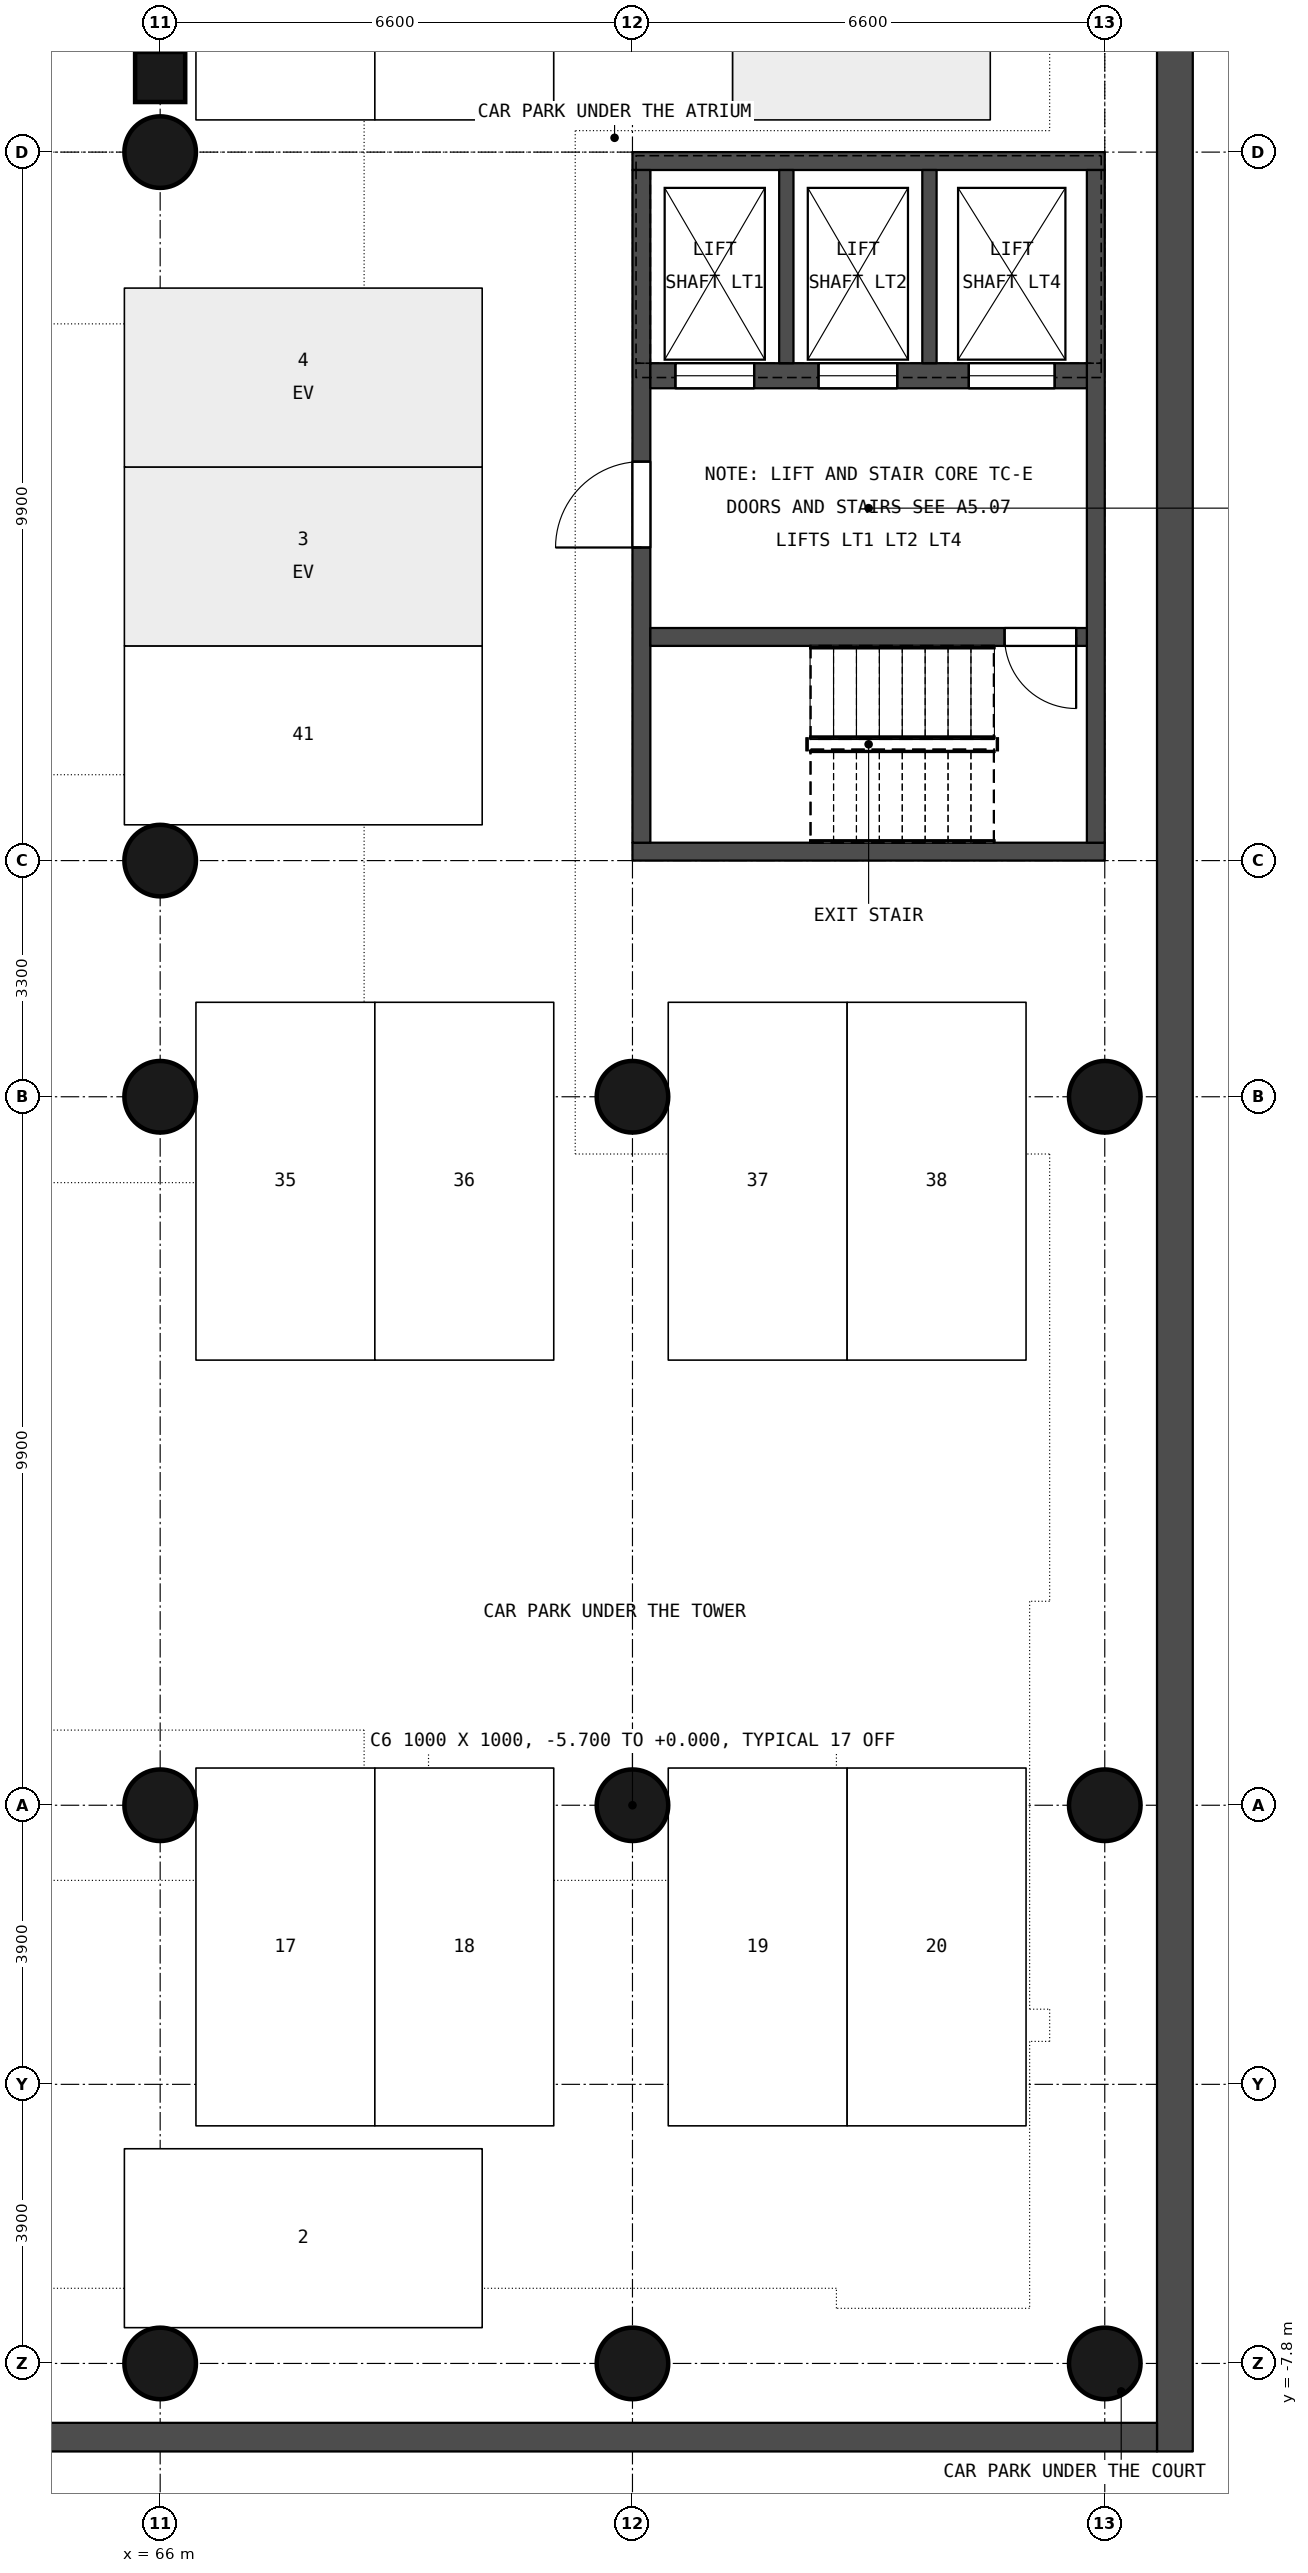
"""IFC4 building model, lengths in metres.
Left out: names, types, materials, properties, quantities, classifications, styles, units other than length and angle.
Written with IfcOpenShell. Run it as: python <this file> out.ifc"""

import sys

from ifc_helpers import new_model, si_unit, direction, frame, frame_2d, origin, origin_2d, place, context, subcontext, project, spatial, rectangle, circle, extrude, element, fill, save


model = new_model("IFC4")
c1 = context("Model", 3, precision=1e-05, world=origin(), true_north=direction((0.0, 1.0)))
c2 = subcontext(c1, "Body", "Model", "MODEL_VIEW")
j1 = project(units=[si_unit("LENGTHUNIT", "METRE"), si_unit("PLANEANGLEUNIT", "RADIAN")], contexts=[c1])
p1 = place(None, origin())
s1 = spatial("IfcSite", under=j1, at=p1, CompositionType="ELEMENT")
p2 = place(p1, origin())
s2 = spatial("IfcBuilding", under=s1, at=p2, CompositionType="ELEMENT")
p3 = place(p2, frame((0.0, 0.0, -5.7)))
s3 = spatial("IfcBuildingStorey", under=s2, at=p3, CompositionType="ELEMENT", Elevation=-5.7)
for number, where, z_axis, x_axis in (
    (1, (66.0, -7.8, 0.0), (0.0, 0.0, 1.0), (1.0, 0.0, 0.0)),
    (2, (66.0, 0.0, 0.0), (0.0, 0.0, 1.0), (1.0, 0.0, 0.0)),
    (3, (66.0, 9.9, 0.0), (0.0, 0.0, 1.0), (1.0, 0.0, 0.0)),
    (4, (66.0, 13.2, 0.0), (0.0, 0.0, 1.0), (1.0, 0.0, 0.0)),
    (5, (66.0, 23.1, 0.0), (0.0, 0.0, 1.0), (1.0, 0.0, 0.0)),
    (6, (72.6, -7.8, 0.0), (0.0, 0.0, 1.0), (1.0, 0.0, 0.0)),
    (7, (72.6, 0.0, 0.0), (0.0, 0.0, 1.0), (1.0, 0.0, 0.0)),
    (8, (72.6, 9.9, 0.0), (0.0, 0.0, 1.0), (1.0, 0.0, 0.0)),
    (9, (79.2, -7.8, 0.0), (0.0, 0.0, 1.0), (1.0, 0.0, 0.0)),
    (10, (79.2, 0.0, 0.0), (0.0, 0.0, 1.0), (1.0, 0.0, 0.0)),
    (11, (79.2, 9.9, 0.0), (0.0, 0.0, 1.0), (1.0, 0.0, 0.0)),
):
    element("IfcColumn", number, at=place(p3, frame(where, z_axis=z_axis, x_axis=x_axis)), inside=s3, PredefinedType="COLUMN", context=c2, shape_type="SweptSolid", body=[
        extrude(circle(Radius=0.5, at=origin_2d()), origin(), (0.0, 0.0, 1.0), 5.7),
    ])
p4 = place(p3, frame((66.0, 24.15, 0.0), z_axis=(0.0, 0.0, 1.0), x_axis=(1.0, 0.0, 0.0)))
e12 = element("IfcColumn", 12, at=p4, inside=s3, PredefinedType="COLUMN", context=c2, shape_type="SweptSolid", body=[
    extrude(rectangle(XDim=0.7, YDim=0.7, at=origin_2d()), origin(), (0.0, 0.0, 1.0), 5.7),
])
for number, where, z_axis, x_axis in (
    (13, (72.6, 13.325, 0.0), (0.0, 0.0, 1.0), (1.0, 0.0, 0.0)),
    (14, (72.6, 22.975, 0.0), (0.0, 0.0, 1.0), (1.0, 0.0, 0.0)),
):
    element("IfcWall", number, at=place(p3, frame(where, z_axis=z_axis, x_axis=x_axis)), inside=s3, PredefinedType="SHEAR", context=c2, shape_type="SweptSolid", body=[
        extrude(rectangle(XDim=6.6, YDim=0.25, at=frame_2d((3.3, 0.0))), origin(), (0.0, 0.0, 1.0), 5.4),
    ])
p5 = place(p3, frame((72.725, 13.45, 0.0), z_axis=(0.0, 0.0, 1.0), x_axis=(0.0, 1.0, 0.0)))
e15 = element("IfcWall", 15, at=p5, inside=s3, PredefinedType="SHEAR", context=c2, shape_type="SweptSolid", body=[
    extrude(rectangle(XDim=9.4, YDim=0.25, at=frame_2d((4.7, 0.0))), origin(), (0.0, 0.0, 1.0), 5.4),
])
p6 = place(p5, frame((4.125, 0.0, 0.0)))
e16 = element("IfcOpeningElement", 16, at=p6, cuts=e15, PredefinedType="OPENING", context=c2, shape_type="SweptSolid", body=[
    extrude(rectangle(XDim=1.2, YDim=2.1, at=frame_2d((0.6, 1.05))), frame((0.0, 0.135, 0.0), z_axis=(0.0, -1.0, 0.0), x_axis=(1.0, 0.0, 0.0)), (0.0, 0.0, 1.0), 0.27),
])
p7 = place(p3, frame((79.075, 13.45, 0.0), z_axis=(0.0, 0.0, 1.0), x_axis=(0.0, 1.0, 0.0)))
e17 = element("IfcWall", 17, at=p7, inside=s3, PredefinedType="SHEAR", context=c2, shape_type="SweptSolid", body=[
    extrude(rectangle(XDim=9.4, YDim=0.25, at=frame_2d((4.7, 0.0))), origin(), (0.0, 0.0, 1.0), 5.4),
])
p8 = place(p3, frame((72.85, 16.325, 0.0), z_axis=(0.0, 0.0, 1.0), x_axis=(1.0, 0.0, 0.0)))
e18 = element("IfcWall", 18, at=p8, inside=s3, PredefinedType="SHEAR", context=c2, shape_type="SweptSolid", body=[
    extrude(rectangle(XDim=6.1, YDim=0.25, at=frame_2d((3.05, 0.0))), origin(), (0.0, 0.0, 1.0), 5.4),
])
p9 = place(p8, frame((4.95, 0.0, 0.0)))
e19 = element("IfcOpeningElement", 19, at=p9, cuts=e18, PredefinedType="OPENING", context=c2, shape_type="SweptSolid", body=[
    extrude(rectangle(XDim=1.0, YDim=2.2, at=frame_2d((0.5, 1.1))), frame((0.0, 0.135, 0.0), z_axis=(0.0, -1.0, 0.0), x_axis=(1.0, 0.0, 0.0)), (0.0, 0.0, 1.0), 0.27),
])
p10 = place(p3, frame((72.85, 19.975, 0.0), z_axis=(0.0, 0.0, 1.0), x_axis=(1.0, 0.0, 0.0)))
e20 = element("IfcWall", 20, at=p10, inside=s3, PredefinedType="SHEAR", context=c2, shape_type="SweptSolid", body=[
    extrude(rectangle(XDim=6.1, YDim=0.35, at=frame_2d((3.05, 0.0))), origin(), (0.0, 0.0, 1.0), 5.4),
])
p11 = place(p10, frame((0.35, 0.0, 0.0)))
e21 = element("IfcOpeningElement", 21, at=p11, cuts=e20, PredefinedType="OPENING", context=c2, shape_type="SweptSolid", body=[
    extrude(rectangle(XDim=1.1, YDim=2.2, at=frame_2d((0.55, 1.1))), frame((0.0, 0.185, 0.0), z_axis=(0.0, -1.0, 0.0), x_axis=(1.0, 0.0, 0.0)), (0.0, 0.0, 1.0), 0.37),
])
p12 = place(p10, frame((2.35, 0.0, 0.0)))
e22 = element("IfcOpeningElement", 22, at=p12, cuts=e20, PredefinedType="OPENING", context=c2, shape_type="SweptSolid", body=[
    extrude(rectangle(XDim=1.1, YDim=2.2, at=frame_2d((0.55, 1.1))), frame((0.0, 0.185, 0.0), z_axis=(0.0, -1.0, 0.0), x_axis=(1.0, 0.0, 0.0)), (0.0, 0.0, 1.0), 0.37),
])
p13 = place(p10, frame((4.45, 0.0, 0.0)))
e23 = element("IfcOpeningElement", 23, at=p13, cuts=e20, PredefinedType="OPENING", context=c2, shape_type="SweptSolid", body=[
    extrude(rectangle(XDim=1.2, YDim=2.3, at=frame_2d((0.6, 1.15))), frame((0.0, 0.185, 0.0), z_axis=(0.0, -1.0, 0.0), x_axis=(1.0, 0.0, 0.0)), (0.0, 0.0, 1.0), 0.37),
])
for number, where, z_axis, x_axis in (
    (24, (74.75, 20.15, 0.0), (0.0, 0.0, 1.0), (0.0, 1.0, 0.0)),
    (25, (76.75, 20.15, 0.0), (0.0, 0.0, 1.0), (0.0, 1.0, 0.0)),
):
    element("IfcWall", number, at=place(p3, frame(where, z_axis=z_axis, x_axis=x_axis)), inside=s3, PredefinedType="SHEAR", context=c2, shape_type="SweptSolid", body=[
        extrude(rectangle(XDim=2.7, YDim=0.2, at=frame_2d((1.35, 0.0))), origin(), (0.0, 0.0, 1.0), 5.4),
    ])
for number, where, z_axis, x_axis in (
    (26, (72.65, 20.05, -1.2), (0.0, 0.0, 1.0), (1.0, 0.0, 0.0)),
    (27, (72.65, 22.95, -1.2), (0.0, 0.0, 1.0), (1.0, 0.0, 0.0)),
):
    element("IfcWall", number, at=place(p3, frame(where, z_axis=z_axis, x_axis=x_axis)), inside=s3, PredefinedType="SHEAR", context=c2, shape_type="SweptSolid", body=[
        extrude(rectangle(XDim=6.5, YDim=0.2, at=frame_2d((3.25, 0.0))), origin(), (0.0, 0.0, 1.0), 0.6),
    ])
for number, where, z_axis, x_axis in (
    (28, (72.75, 20.15, -1.2), (0.0, 0.0, 1.0), (0.0, 1.0, 0.0)),
    (29, (79.05, 20.15, -1.2), (0.0, 0.0, 1.0), (0.0, 1.0, 0.0)),
):
    element("IfcWall", number, at=place(p3, frame(where, z_axis=z_axis, x_axis=x_axis)), inside=s3, PredefinedType="SHEAR", context=c2, shape_type="SweptSolid", body=[
        extrude(rectangle(XDim=2.7, YDim=0.2, at=frame_2d((1.35, 0.0))), origin(), (0.0, 0.0, 1.0), 0.6),
    ])
p14 = place(p3, frame((80.18, -9.03, 0.0), z_axis=(0.0, 0.0, 1.0), x_axis=(0.0, 1.0, 0.0)))
e30 = element("IfcWall", 30, at=p14, inside=s3, PredefinedType="SOLIDWALL", context=c2, shape_type="SweptSolid", body=[
    extrude(rectangle(XDim=109.26, YDim=0.5, at=frame_2d((54.63, 0.0))), origin(), (0.0, 0.0, 1.0), 5.2),
])
p15 = place(p3, frame((-0.5, -8.83, 0.0), z_axis=(0.0, 0.0, 1.0), x_axis=(1.0, 0.0, 0.0)))
e31 = element("IfcWall", 31, at=p15, inside=s3, PredefinedType="SOLIDWALL", context=c2, shape_type="SweptSolid", body=[
    extrude(rectangle(XDim=80.43, YDim=0.4, at=frame_2d((40.215, 0.0))), origin(), (0.0, 0.0, 1.0), 5.2),
])
p16 = place(p6, origin())
e32 = element("IfcDoor", 32, at=p16, inside=s3, OperationType="SINGLE_SWING_LEFT", PredefinedType="DOOR", context=c2, shape_type="SweptSolid", body=[
    extrude(rectangle(XDim=1.2, YDim=2.1, at=frame_2d((0.6, 1.05))), frame((0.0, 0.025, 0.0), z_axis=(0.0, -1.0, 0.0), x_axis=(1.0, 0.0, 0.0)), (0.0, 0.0, 1.0), 0.05),
])
fill(e16, e32)
p17 = place(p9, origin())
e33 = element("IfcDoor", 33, at=p17, inside=s3, OperationType="SINGLE_SWING_RIGHT", PredefinedType="DOOR", context=c2, shape_type="SweptSolid", body=[
    extrude(rectangle(XDim=1.0, YDim=2.2, at=frame_2d((0.5, 1.1))), frame((0.0, 0.025, 0.0), z_axis=(0.0, -1.0, 0.0), x_axis=(1.0, 0.0, 0.0)), (0.0, 0.0, 1.0), 0.05),
])
fill(e19, e33)
p18 = place(p11, origin())
e34 = element("IfcDoor", 34, at=p18, inside=s3, OperationType="DOUBLE_DOOR_SLIDING", PredefinedType="NOTDEFINED", context=c2, shape_type="SweptSolid", body=[
    extrude(rectangle(XDim=1.1, YDim=2.2, at=frame_2d((0.55, 1.1))), frame((0.0, 0.025, 0.0), z_axis=(0.0, -1.0, 0.0), x_axis=(1.0, 0.0, 0.0)), (0.0, 0.0, 1.0), 0.05),
])
fill(e21, e34)
p19 = place(p12, origin())
e35 = element("IfcDoor", 35, at=p19, inside=s3, OperationType="DOUBLE_DOOR_SLIDING", PredefinedType="NOTDEFINED", context=c2, shape_type="SweptSolid", body=[
    extrude(rectangle(XDim=1.1, YDim=2.2, at=frame_2d((0.55, 1.1))), frame((0.0, 0.025, 0.0), z_axis=(0.0, -1.0, 0.0), x_axis=(1.0, 0.0, 0.0)), (0.0, 0.0, 1.0), 0.05),
])
fill(e22, e35)
p20 = place(p13, origin())
e36 = element("IfcDoor", 36, at=p20, inside=s3, OperationType="DOUBLE_DOOR_SLIDING", PredefinedType="NOTDEFINED", context=c2, shape_type="SweptSolid", body=[
    extrude(rectangle(XDim=1.2, YDim=2.3, at=frame_2d((0.6, 1.15))), frame((0.0, 0.025, 0.0), z_axis=(0.0, -1.0, 0.0), x_axis=(1.0, 0.0, 0.0)), (0.0, 0.0, 1.0), 0.05),
])
fill(e23, e36)
save(model, sys.argv[1])
